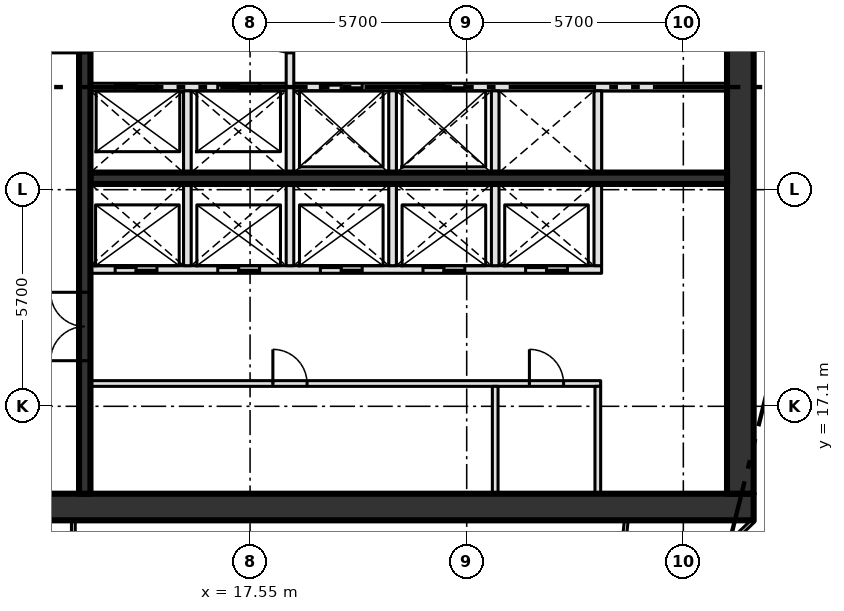
"""IFC4 building model, lengths in metres.
Left out: names, types, materials, properties, quantities, classifications, styles, units other than length and angle.
Written with IfcOpenShell. Run it as: python <this file> out.ifc"""

import sys

from ifc_helpers import new_model, si_unit, direction, frame, frame_2d, origin, place, context, subcontext, project, spatial, rectangle, extrude, element, fill, save


model = new_model("IFC4")
c1 = context("Model", 3, precision=1e-05, world=origin(), true_north=direction((0.0, 1.0)))
c2 = subcontext(c1, "Body", "Model", "MODEL_VIEW")
j1 = project(units=[si_unit("LENGTHUNIT", "METRE"), si_unit("PLANEANGLEUNIT", "RADIAN")], contexts=[c1])
p1 = place(None, origin())
s1 = spatial("IfcSite", under=j1, at=p1, CompositionType="ELEMENT")
p2 = place(p1, origin())
s2 = spatial("IfcBuilding", under=s1, at=p2, CompositionType="ELEMENT")
p3 = place(p2, frame((0.0, 0.0, 229.8)))
s3 = spatial("IfcBuildingStorey", under=s2, at=p3, CompositionType="ELEMENT", Elevation=229.8)
p4 = place(p3, frame((8.0, 14.45, -0.3), z_axis=(0.0, 0.0, 1.0), x_axis=(1.0, 0.0, 0.0)))
e1 = element("IfcWall", 1, at=p4, inside=s3, PredefinedType="SHEAR", context=c2, shape_type="SweptSolid", body=[
    extrude(rectangle(XDim=22.8, YDim=0.7, at=frame_2d((11.4, 0.0))), origin(), (0.0, 0.0, 1.0), 4.2),
])
p5 = place(p4, frame((2.3, 0.0, 0.3)))
e2 = element("IfcOpeningElement", 2, at=p5, cuts=e1, PredefinedType="OPENING", context=c2, shape_type="SweptSolid", body=[
    extrude(rectangle(XDim=1.8, YDim=2.1, at=frame_2d((0.9, 1.05))), frame((0.0, 0.36, 0.0), z_axis=(0.0, -1.0, 0.0), x_axis=(1.0, 0.0, 0.0)), (0.0, 0.0, 1.0), 0.72),
])
p6 = place(p3, frame((30.45, 14.8, -0.3), z_axis=(0.0, 0.0, 1.0), x_axis=(0.0, 1.0, 0.0)))
e3 = element("IfcWall", 3, at=p6, inside=s3, PredefinedType="SHEAR", context=c2, shape_type="SweptSolid", body=[
    extrude(rectangle(XDim=20.9, YDim=0.7, at=frame_2d((10.45, 0.0))), origin(), (0.0, 0.0, 1.0), 4.2),
])
p7 = place(p3, frame((13.35, 17.7, 0.0), z_axis=(0.0, 0.0, 1.0), x_axis=(1.0, 0.0, 0.0)))
e4 = element("IfcWall", 4, at=p7, inside=s3, PredefinedType="PARTITIONING", context=c2, shape_type="SweptSolid", body=[
    extrude(rectangle(XDim=13.425, YDim=0.15, at=frame_2d((6.712, 0.0))), origin(), (0.0, 0.0, 1.0), 3.9),
])
p8 = place(p7, frame((4.8, 0.0, 0.0)))
e5 = element("IfcOpeningElement", 5, at=p8, cuts=e4, PredefinedType="OPENING", context=c2, shape_type="SweptSolid", body=[
    extrude(rectangle(XDim=0.9, YDim=2.1, at=frame_2d((0.45, 1.05))), frame((0.0, 0.085, 0.0), z_axis=(0.0, -1.0, 0.0), x_axis=(1.0, 0.0, 0.0)), (0.0, 0.0, 1.0), 0.17),
])
p9 = place(p7, frame((11.55, 0.0, 0.0)))
e6 = element("IfcOpeningElement", 6, at=p9, cuts=e4, PredefinedType="OPENING", context=c2, shape_type="SweptSolid", body=[
    extrude(rectangle(XDim=0.9, YDim=2.1, at=frame_2d((0.45, 1.05))), frame((0.0, 0.085, 0.0), z_axis=(0.0, -1.0, 0.0), x_axis=(1.0, 0.0, 0.0)), (0.0, 0.0, 1.0), 0.17),
])
p10 = place(p3, frame((13.35, 20.7, 0.0), z_axis=(0.0, 0.0, 1.0), x_axis=(1.0, 0.0, 0.0)))
e7 = element("IfcWall", 7, at=p10, inside=s3, PredefinedType="SOLIDWALL", context=c2, shape_type="SweptSolid", body=[
    extrude(rectangle(XDim=13.45, YDim=0.2, at=frame_2d((6.725, 0.0))), origin(), (0.0, 0.0, 1.0), 3.9),
])
p11 = place(p10, frame((0.65, 0.0, 0.0)))
e8 = element("IfcOpeningElement", 8, at=p11, cuts=e7, PredefinedType="OPENING", context=c2, shape_type="SweptSolid", body=[
    extrude(rectangle(XDim=1.1, YDim=2.1, at=frame_2d((0.55, 1.05))), frame((0.0, 0.11, 0.0), z_axis=(0.0, -1.0, 0.0), x_axis=(1.0, 0.0, 0.0)), (0.0, 0.0, 1.0), 0.22),
])
p12 = place(p10, frame((3.35, 0.0, 0.0)))
e9 = element("IfcOpeningElement", 9, at=p12, cuts=e7, PredefinedType="OPENING", context=c2, shape_type="SweptSolid", body=[
    extrude(rectangle(XDim=1.1, YDim=2.1, at=frame_2d((0.55, 1.05))), frame((0.0, 0.11, 0.0), z_axis=(0.0, -1.0, 0.0), x_axis=(1.0, 0.0, 0.0)), (0.0, 0.0, 1.0), 0.22),
])
p13 = place(p10, frame((6.05, 0.0, 0.0)))
e10 = element("IfcOpeningElement", 10, at=p13, cuts=e7, PredefinedType="OPENING", context=c2, shape_type="SweptSolid", body=[
    extrude(rectangle(XDim=1.1, YDim=2.1, at=frame_2d((0.55, 1.05))), frame((0.0, 0.11, 0.0), z_axis=(0.0, -1.0, 0.0), x_axis=(1.0, 0.0, 0.0)), (0.0, 0.0, 1.0), 0.22),
])
p14 = place(p10, frame((8.75, 0.0, 0.0)))
e11 = element("IfcOpeningElement", 11, at=p14, cuts=e7, PredefinedType="OPENING", context=c2, shape_type="SweptSolid", body=[
    extrude(rectangle(XDim=1.1, YDim=2.1, at=frame_2d((0.55, 1.05))), frame((0.0, 0.11, 0.0), z_axis=(0.0, -1.0, 0.0), x_axis=(1.0, 0.0, 0.0)), (0.0, 0.0, 1.0), 0.22),
])
p15 = place(p10, frame((11.45, 0.0, 0.0)))
e12 = element("IfcOpeningElement", 12, at=p15, cuts=e7, PredefinedType="OPENING", context=c2, shape_type="SweptSolid", body=[
    extrude(rectangle(XDim=1.1, YDim=2.1, at=frame_2d((0.55, 1.05))), frame((0.0, 0.11, 0.0), z_axis=(0.0, -1.0, 0.0), x_axis=(1.0, 0.0, 0.0)), (0.0, 0.0, 1.0), 0.22),
])
p16 = place(p3, frame((13.35, 23.1, 0.0), z_axis=(0.0, 0.0, 1.0), x_axis=(1.0, 0.0, 0.0)))
e13 = element("IfcWall", 13, at=p16, inside=s3, PredefinedType="SHEAR", context=c2, shape_type="SweptSolid", body=[
    extrude(rectangle(XDim=16.75, YDim=0.3, at=frame_2d((8.375, 0.0))), origin(), (0.0, 0.0, 1.0), 3.9),
])
p17 = place(p3, frame((13.35, 25.5, 0.0), z_axis=(0.0, 0.0, 1.0), x_axis=(1.0, 0.0, 0.0)))
e14 = element("IfcWall", 14, at=p17, inside=s3, PredefinedType="SOLIDWALL", context=c2, shape_type="SweptSolid", body=[
    extrude(rectangle(XDim=16.75, YDim=0.2, at=frame_2d((8.375, 0.0))), origin(), (0.0, 0.0, 1.0), 3.9),
])
p18 = place(p17, frame((0.65, 0.0, 0.0)))
e15 = element("IfcOpeningElement", 15, at=p18, cuts=e14, PredefinedType="OPENING", context=c2, shape_type="SweptSolid", body=[
    extrude(rectangle(XDim=1.1, YDim=2.1, at=frame_2d((0.55, 1.05))), frame((0.0, 0.11, 0.0), z_axis=(0.0, -1.0, 0.0), x_axis=(1.0, 0.0, 0.0)), (0.0, 0.0, 1.0), 0.22),
])
p19 = place(p17, frame((3.35, 0.0, 0.0)))
e16 = element("IfcOpeningElement", 16, at=p19, cuts=e14, PredefinedType="OPENING", context=c2, shape_type="SweptSolid", body=[
    extrude(rectangle(XDim=1.1, YDim=2.1, at=frame_2d((0.55, 1.05))), frame((0.0, 0.11, 0.0), z_axis=(0.0, -1.0, 0.0), x_axis=(1.0, 0.0, 0.0)), (0.0, 0.0, 1.0), 0.22),
])
p20 = place(p17, frame((6.05, 0.0, 0.0)))
e17 = element("IfcOpeningElement", 17, at=p20, cuts=e14, PredefinedType="OPENING", context=c2, shape_type="SweptSolid", body=[
    extrude(rectangle(XDim=1.1, YDim=2.1, at=frame_2d((0.55, 1.05))), frame((0.0, 0.11, 0.0), z_axis=(0.0, -1.0, 0.0), x_axis=(1.0, 0.0, 0.0)), (0.0, 0.0, 1.0), 0.22),
])
p21 = place(p17, frame((8.75, 0.0, 0.0)))
e18 = element("IfcOpeningElement", 18, at=p21, cuts=e14, PredefinedType="OPENING", context=c2, shape_type="SweptSolid", body=[
    extrude(rectangle(XDim=1.1, YDim=2.1, at=frame_2d((0.55, 1.05))), frame((0.0, 0.11, 0.0), z_axis=(0.0, -1.0, 0.0), x_axis=(1.0, 0.0, 0.0)), (0.0, 0.0, 1.0), 0.22),
])
p22 = place(p3, frame((13.2, 14.8, 0.0), z_axis=(0.0, 0.0, 1.0), x_axis=(0.0, 1.0, 0.0)))
e19 = element("IfcWall", 19, at=p22, inside=s3, PredefinedType="SHEAR", context=c2, shape_type="SweptSolid", body=[
    extrude(rectangle(XDim=20.9, YDim=0.3, at=frame_2d((10.45, 0.0))), origin(), (0.0, 0.0, 1.0), 3.9),
])
p23 = place(p22, frame((3.5, 0.0, 0.0)))
e20 = element("IfcOpeningElement", 20, at=p23, cuts=e19, PredefinedType="OPENING", context=c2, shape_type="SweptSolid", body=[
    extrude(rectangle(XDim=1.8, YDim=2.1, at=frame_2d((0.9, 1.05))), frame((0.0, 0.16, 0.0), z_axis=(0.0, -1.0, 0.0), x_axis=(1.0, 0.0, 0.0)), (0.0, 0.0, 1.0), 0.32),
])
p24 = place(p22, frame((11.6, 0.0, 0.0)))
e21 = element("IfcOpeningElement", 21, at=p24, cuts=e19, PredefinedType="OPENING", context=c2, shape_type="SweptSolid", body=[
    extrude(rectangle(XDim=1.2, YDim=2.1, at=frame_2d((0.6, 1.05))), frame((0.0, 0.16, 0.0), z_axis=(0.0, -1.0, 0.0), x_axis=(1.0, 0.0, 0.0)), (0.0, 0.0, 1.0), 0.32),
])
p25 = place(p3, frame((15.9, 20.8, 0.0), z_axis=(0.0, 0.0, 1.0), x_axis=(0.0, 1.0, 0.0)))
e22 = element("IfcWall", 22, at=p25, inside=s3, PredefinedType="SOLIDWALL", context=c2, shape_type="SweptSolid", body=[
    extrude(rectangle(XDim=4.6, YDim=0.2, at=frame_2d((2.3, 0.0))), origin(), (0.0, 0.0, 1.0), 3.9),
])
p26 = place(p3, frame((18.6, 20.8, 0.0), z_axis=(0.0, 0.0, 1.0), x_axis=(0.0, 1.0, 0.0)))
e23 = element("IfcWall", 23, at=p26, inside=s3, PredefinedType="SOLIDWALL", context=c2, shape_type="SweptSolid", body=[
    extrude(rectangle(XDim=7.6, YDim=0.2, at=frame_2d((3.8, 0.0))), origin(), (0.0, 0.0, 1.0), 3.9),
])
p27 = place(p26, frame((5.6, 0.0, 0.0)))
e24 = element("IfcOpeningElement", 24, at=p27, cuts=e23, PredefinedType="OPENING", context=c2, shape_type="SweptSolid", body=[
    extrude(rectangle(XDim=1.2, YDim=2.1, at=frame_2d((0.6, 1.05))), frame((0.0, 0.11, 0.0), z_axis=(0.0, -1.0, 0.0), x_axis=(1.0, 0.0, 0.0)), (0.0, 0.0, 1.0), 0.22),
])
p28 = place(p3, frame((21.3, 20.8, 0.0), z_axis=(0.0, 0.0, 1.0), x_axis=(0.0, 1.0, 0.0)))
e25 = element("IfcWall", 25, at=p28, inside=s3, PredefinedType="SOLIDWALL", context=c2, shape_type="SweptSolid", body=[
    extrude(rectangle(XDim=4.6, YDim=0.2, at=frame_2d((2.3, 0.0))), origin(), (0.0, 0.0, 1.0), 3.9),
])
p29 = place(p3, frame((24.0, 14.8, 0.0), z_axis=(0.0, 0.0, 1.0), x_axis=(0.0, 1.0, 0.0)))
e26 = element("IfcWall", 26, at=p29, inside=s3, PredefinedType="PARTITIONING", context=c2, shape_type="SweptSolid", body=[
    extrude(rectangle(XDim=2.825, YDim=0.15, at=frame_2d((1.413, 0.0))), origin(), (0.0, 0.0, 1.0), 3.9),
])
p30 = place(p3, frame((24.0, 20.8, 0.0), z_axis=(0.0, 0.0, 1.0), x_axis=(0.0, 1.0, 0.0)))
e27 = element("IfcWall", 27, at=p30, inside=s3, PredefinedType="SOLIDWALL", context=c2, shape_type="SweptSolid", body=[
    extrude(rectangle(XDim=4.6, YDim=0.2, at=frame_2d((2.3, 0.0))), origin(), (0.0, 0.0, 1.0), 3.9),
])
p31 = place(p3, frame((26.7, 14.8, 0.0), z_axis=(0.0, 0.0, 1.0), x_axis=(0.0, 1.0, 0.0)))
e28 = element("IfcWall", 28, at=p31, inside=s3, PredefinedType="PARTITIONING", context=c2, shape_type="SweptSolid", body=[
    extrude(rectangle(XDim=2.825, YDim=0.15, at=frame_2d((1.413, 0.0))), origin(), (0.0, 0.0, 1.0), 3.9),
])
p32 = place(p3, frame((26.7, 20.8, 0.0), z_axis=(0.0, 0.0, 1.0), x_axis=(0.0, 1.0, 0.0)))
e29 = element("IfcWall", 29, at=p32, inside=s3, PredefinedType="SOLIDWALL", context=c2, shape_type="SweptSolid", body=[
    extrude(rectangle(XDim=4.6, YDim=0.2, at=frame_2d((2.3, 0.0))), origin(), (0.0, 0.0, 1.0), 3.9),
])
p33 = place(p3, frame((12.9, 10.078, 0.0), z_axis=(0.0, 0.0, 1.0), x_axis=(0.0, 1.0, 0.0)))
e30 = element("IfcWall", 30, at=p33, inside=s3, PredefinedType="PARTITIONING", context=c2, shape_type="SweptSolid", body=[
    extrude(rectangle(XDim=4.022, YDim=0.1, at=frame_2d((2.011, 0.0))), origin(), (0.0, 0.0, 1.0), 3.9),
])
p34 = place(p33, frame((1.18, 0.0, 0.0)))
e31 = element("IfcOpeningElement", 31, at=p34, cuts=e30, PredefinedType="OPENING", context=c2, shape_type="SweptSolid", body=[
    extrude(rectangle(XDim=1.8, YDim=2.1, at=frame_2d((0.9, 1.05))), frame((0.0, 0.06, 0.0), z_axis=(0.0, -1.0, 0.0), x_axis=(1.0, 0.0, 0.0)), (0.0, 0.0, 1.0), 0.12),
])
p35 = place(p3, frame((30.8, 14.1, 0.0), z_axis=(0.0, 0.0, 1.0), x_axis=(-0.722911025189, -0.690941133281, 0.0)))
e32 = element("IfcWall", 32, at=p35, inside=s3, PredefinedType="PARTITIONING", context=c2, shape_type="SweptSolid", body=[
    extrude(rectangle(XDim=0.748, YDim=0.1, at=frame_2d((0.374, 0.0))), origin(), (0.0, 0.0, 1.0), 3.9),
])
p36 = place(p3, frame((26.608, 6.105, 0.0), z_axis=(0.0, 0.0, 1.0), x_axis=(0.104619970127, 0.994512273353, 0.0)))
e33 = element("IfcWall", 33, at=p36, inside=s3, PredefinedType="PARTITIONING", context=c2, shape_type="SweptSolid", body=[
    extrude(rectangle(XDim=8.039, YDim=0.1, at=frame_2d((4.02, 0.0))), origin(), (0.0, 0.0, 1.0), 3.9),
])
p37 = place(p11, origin())
e34 = element("IfcDoor", 34, at=p37, inside=s3, OperationType="SLIDING_TO_LEFT", PredefinedType="DOOR", context=c2, shape_type="SweptSolid", body=[
    extrude(rectangle(XDim=1.1, YDim=2.1, at=frame_2d((0.55, 1.05))), frame((0.0, 0.025, 0.0), z_axis=(0.0, -1.0, 0.0), x_axis=(1.0, 0.0, 0.0)), (0.0, 0.0, 1.0), 0.05),
])
fill(e8, e34)
p38 = place(p12, origin())
e35 = element("IfcDoor", 35, at=p38, inside=s3, OperationType="SLIDING_TO_LEFT", PredefinedType="DOOR", context=c2, shape_type="SweptSolid", body=[
    extrude(rectangle(XDim=1.1, YDim=2.1, at=frame_2d((0.55, 1.05))), frame((0.0, 0.025, 0.0), z_axis=(0.0, -1.0, 0.0), x_axis=(1.0, 0.0, 0.0)), (0.0, 0.0, 1.0), 0.05),
])
fill(e9, e35)
p39 = place(p13, origin())
e36 = element("IfcDoor", 36, at=p39, inside=s3, OperationType="SLIDING_TO_LEFT", PredefinedType="DOOR", context=c2, shape_type="SweptSolid", body=[
    extrude(rectangle(XDim=1.1, YDim=2.1, at=frame_2d((0.55, 1.05))), frame((0.0, 0.025, 0.0), z_axis=(0.0, -1.0, 0.0), x_axis=(1.0, 0.0, 0.0)), (0.0, 0.0, 1.0), 0.05),
])
fill(e10, e36)
p40 = place(p14, origin())
e37 = element("IfcDoor", 37, at=p40, inside=s3, OperationType="SLIDING_TO_LEFT", PredefinedType="DOOR", context=c2, shape_type="SweptSolid", body=[
    extrude(rectangle(XDim=1.1, YDim=2.1, at=frame_2d((0.55, 1.05))), frame((0.0, 0.025, 0.0), z_axis=(0.0, -1.0, 0.0), x_axis=(1.0, 0.0, 0.0)), (0.0, 0.0, 1.0), 0.05),
])
fill(e11, e37)
p41 = place(p15, origin())
e38 = element("IfcDoor", 38, at=p41, inside=s3, OperationType="SLIDING_TO_LEFT", PredefinedType="DOOR", context=c2, shape_type="SweptSolid", body=[
    extrude(rectangle(XDim=1.1, YDim=2.1, at=frame_2d((0.55, 1.05))), frame((0.0, 0.025, 0.0), z_axis=(0.0, -1.0, 0.0), x_axis=(1.0, 0.0, 0.0)), (0.0, 0.0, 1.0), 0.05),
])
fill(e12, e38)
p42 = place(p18, origin())
e39 = element("IfcDoor", 39, at=p42, inside=s3, OperationType="SLIDING_TO_LEFT", PredefinedType="DOOR", context=c2, shape_type="SweptSolid", body=[
    extrude(rectangle(XDim=1.1, YDim=2.1, at=frame_2d((0.55, 1.05))), frame((0.0, 0.025, 0.0), z_axis=(0.0, -1.0, 0.0), x_axis=(1.0, 0.0, 0.0)), (0.0, 0.0, 1.0), 0.05),
])
fill(e15, e39)
p43 = place(p19, origin())
e40 = element("IfcDoor", 40, at=p43, inside=s3, OperationType="SLIDING_TO_LEFT", PredefinedType="DOOR", context=c2, shape_type="SweptSolid", body=[
    extrude(rectangle(XDim=1.1, YDim=2.1, at=frame_2d((0.55, 1.05))), frame((0.0, 0.025, 0.0), z_axis=(0.0, -1.0, 0.0), x_axis=(1.0, 0.0, 0.0)), (0.0, 0.0, 1.0), 0.05),
])
fill(e16, e40)
p44 = place(p20, origin())
e41 = element("IfcDoor", 41, at=p44, inside=s3, OperationType="SLIDING_TO_LEFT", PredefinedType="DOOR", context=c2, shape_type="SweptSolid", body=[
    extrude(rectangle(XDim=1.1, YDim=2.1, at=frame_2d((0.55, 1.05))), frame((0.0, 0.025, 0.0), z_axis=(0.0, -1.0, 0.0), x_axis=(1.0, 0.0, 0.0)), (0.0, 0.0, 1.0), 0.05),
])
fill(e17, e41)
p45 = place(p21, origin())
e42 = element("IfcDoor", 42, at=p45, inside=s3, OperationType="SLIDING_TO_LEFT", PredefinedType="DOOR", context=c2, shape_type="SweptSolid", body=[
    extrude(rectangle(XDim=1.1, YDim=2.1, at=frame_2d((0.55, 1.05))), frame((0.0, 0.025, 0.0), z_axis=(0.0, -1.0, 0.0), x_axis=(1.0, 0.0, 0.0)), (0.0, 0.0, 1.0), 0.05),
])
fill(e18, e42)
p46 = place(p8, origin())
e43 = element("IfcDoor", 43, at=p46, inside=s3, OperationType="SINGLE_SWING_LEFT", PredefinedType="DOOR", context=c2, shape_type="SweptSolid", body=[
    extrude(rectangle(XDim=0.9, YDim=2.1, at=frame_2d((0.45, 1.05))), frame((0.0, 0.025, 0.0), z_axis=(0.0, -1.0, 0.0), x_axis=(1.0, 0.0, 0.0)), (0.0, 0.0, 1.0), 0.05),
])
fill(e5, e43)
p47 = place(p9, origin())
e44 = element("IfcDoor", 44, at=p47, inside=s3, OperationType="SINGLE_SWING_LEFT", PredefinedType="DOOR", context=c2, shape_type="SweptSolid", body=[
    extrude(rectangle(XDim=0.9, YDim=2.1, at=frame_2d((0.45, 1.05))), frame((0.0, 0.025, 0.0), z_axis=(0.0, -1.0, 0.0), x_axis=(1.0, 0.0, 0.0)), (0.0, 0.0, 1.0), 0.05),
])
fill(e6, e44)
p48 = place(p23, origin())
e45 = element("IfcDoor", 45, at=p48, inside=s3, OperationType="DOUBLE_DOOR_SINGLE_SWING", PredefinedType="DOOR", context=c2, shape_type="SweptSolid", body=[
    extrude(rectangle(XDim=1.8, YDim=2.1, at=frame_2d((0.9, 1.05))), frame((0.0, 0.025, 0.0), z_axis=(0.0, -1.0, 0.0), x_axis=(1.0, 0.0, 0.0)), (0.0, 0.0, 1.0), 0.05),
])
fill(e20, e45)
save(model, sys.argv[1])
